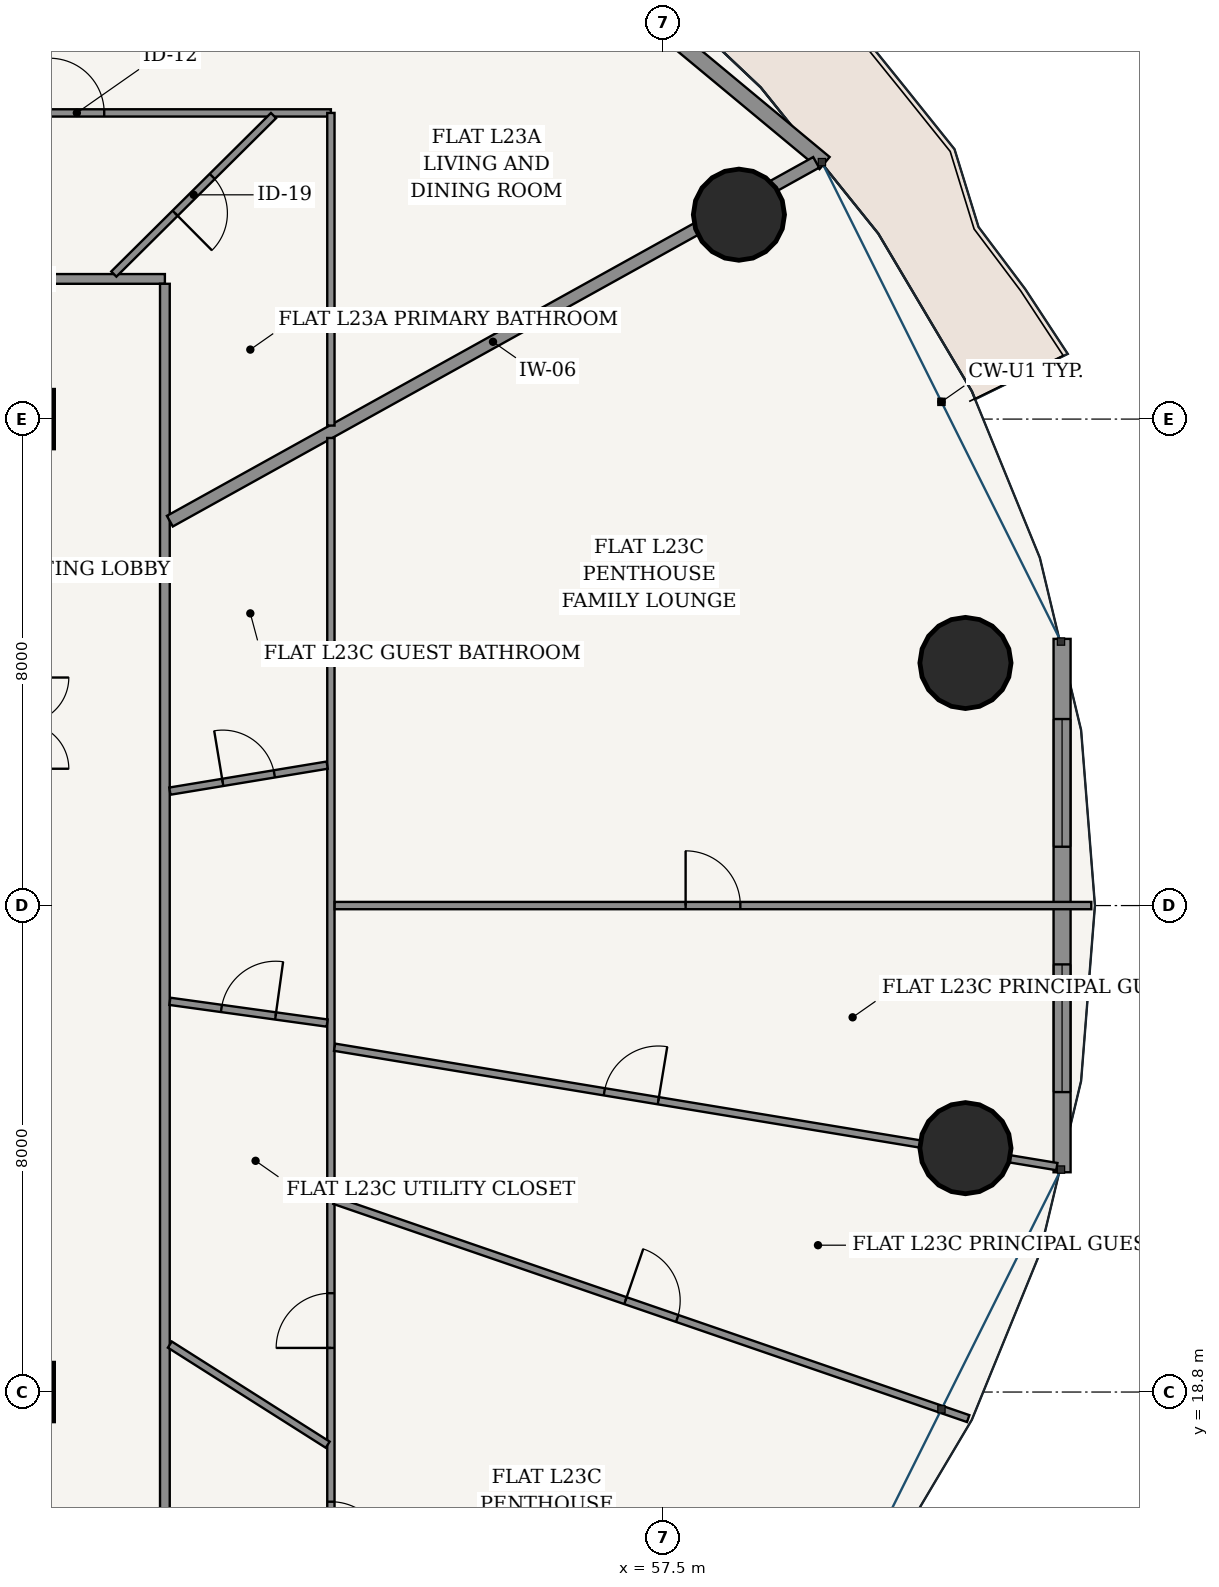
"""IFC4 building model, lengths in metres.
Left out: names, types, materials, properties, quantities, classifications, styles, units other than length and angle.
Written with IfcOpenShell. Run it as: python <this file> out.ifc"""

import sys

from ifc_helpers import new_model, si_unit, direction, frame, frame_2d, origin, origin_2d, place, context, subcontext, project, spatial, rectangle, hollow_circle, extrude, source, transform, mapped, element, fill, save


model = new_model("IFC4")
c1 = context("Model", 3, precision=1e-05, world=origin(), true_north=direction((-0.2419218956, 0.970295726276)))
c2 = subcontext(c1, "Body", "Model", "MODEL_VIEW")
j1 = project(units=[si_unit("LENGTHUNIT", "METRE"), si_unit("PLANEANGLEUNIT", "RADIAN")], contexts=[c1])
p1 = place(None, origin())
s1 = spatial("IfcSite", under=j1, at=p1, CompositionType="ELEMENT")
p2 = place(p1, origin())
s2 = spatial("IfcBuilding", under=s1, at=p2, CompositionType="ELEMENT")
p3 = place(p2, frame((0.0, 0.0, 90.6)))
s3 = spatial("IfcBuildingStorey", under=s2, at=p3, CompositionType="ELEMENT", Elevation=90.6)
for number, where, z_axis, x_axis in (
    (1, (47.0, 18.8, 0.0), (0.0, 0.0, 1.0), (1.0, 0.0, 0.0)),
    (2, (47.0, 34.8, 0.0), (0.0, 0.0, 1.0), (1.0, 0.0, 0.0)),
):
    element("IfcColumn", number, at=place(p3, frame(where, z_axis=z_axis, x_axis=x_axis)), inside=s3, PredefinedType="COLUMN", context=c2, shape_type="SweptSolid", body=[
        extrude(rectangle(XDim=0.95, YDim=0.95, at=origin_2d()), origin(), (0.0, 0.0, 1.0), 3.6),
    ])
for number, where, z_axis, x_axis in (
    (3, (62.471, 30.79, 0.0), (0.0, 0.0, 1.0), (1.0, 0.0, 0.0)),
    (4, (58.745, 38.161, 0.0), (0.0, 0.0, 1.0), (1.0, 0.0, 0.0)),
    (5, (62.471, 22.81, 0.0), (0.0, 0.0, 1.0), (1.0, 0.0, 0.0)),
):
    element("IfcColumn", number, at=place(p3, frame(where, z_axis=z_axis, x_axis=x_axis)), inside=s3, PredefinedType="COLUMN", context=c2, shape_type="SweptSolid", body=[
        extrude(hollow_circle(Radius=0.75, WallThickness=0.045, at=origin_2d()), origin(), (0.0, 0.0, 1.0), 3.6),
    ])
p4 = place(p3, frame((60.154, 39.01, 0.0), z_axis=(0.0, 0.0, 1.0), x_axis=(-0.769242574941, 0.638956853706, 0.0)))
e6 = element("IfcWall", 6, at=p4, inside=s3, PredefinedType="SOLIDWALL", context=c2, shape_type="SweptSolid", body=[
    extrude(rectangle(XDim=9.69, YDim=0.26, at=frame_2d((4.845, 0.0))), origin(), (0.0, 0.0, 1.0), 3.325),
])
p5 = place(p4, frame((4.17, 0.0, 0.0)))
e7 = element("IfcOpeningElement", 7, at=p5, cuts=e6, PredefinedType="OPENING", context=c2, shape_type="SweptSolid", body=[
    extrude(rectangle(XDim=1.35, YDim=2.2, at=frame_2d((0.675, 1.1))), frame((0.0, 0.14, 0.0), z_axis=(0.0, -1.0, 0.0), x_axis=(1.0, 0.0, 0.0)), (0.0, 0.0, 1.0), 0.28),
])
p6 = place(p3, frame((64.06, 22.414, 0.0), z_axis=(0.0, 0.0, 1.0), x_axis=(0.0, 1.0, 0.0)))
e8 = element("IfcWall", 8, at=p6, inside=s3, PredefinedType="SOLIDWALL", context=c2, shape_type="SweptSolid", body=[
    extrude(rectangle(XDim=8.771, YDim=0.28, at=frame_2d((4.386, 0.0))), origin(), (0.0, 0.0, 1.0), 3.325),
])
p7 = place(p6, frame((1.318, 0.0, 0.85)))
e9 = element("IfcOpeningElement", 9, at=p7, cuts=e8, PredefinedType="OPENING", context=c2, shape_type="SweptSolid", body=[
    extrude(rectangle(XDim=2.1, YDim=1.95, at=frame_2d((1.05, 0.975))), frame((0.0, 0.15, 0.0), z_axis=(0.0, -1.0, 0.0), x_axis=(1.0, 0.0, 0.0)), (0.0, 0.0, 1.0), 0.3),
])
p8 = place(p6, frame((5.353, 0.0, 0.85)))
e10 = element("IfcOpeningElement", 10, at=p8, cuts=e8, PredefinedType="OPENING", context=c2, shape_type="SweptSolid", body=[
    extrude(rectangle(XDim=2.1, YDim=1.95, at=frame_2d((1.05, 0.975))), frame((0.0, 0.15, 0.0), z_axis=(0.0, -1.0, 0.0), x_axis=(1.0, 0.0, 0.0)), (0.0, 0.0, 1.0), 0.3),
])
p9 = place(p3, frame((26.695, 37.105, 0.0), z_axis=(0.0, 0.0, 1.0), x_axis=(1.0, 0.0, 0.0)))
e11 = element("IfcWall", 11, at=p9, inside=s3, PredefinedType="PARTITIONING", context=c2, shape_type="SweptSolid", body=[
    extrude(rectangle(XDim=22.61, YDim=0.16, at=frame_2d((11.305, 0.0))), origin(), (0.0, 0.0, 1.0), 2.767),
])
p10 = place(p9, frame((18.058, 0.0, 0.0)))
e12 = element("IfcOpeningElement", 12, at=p10, cuts=e11, PredefinedType="OPENING", context=c2, shape_type="SweptSolid", body=[
    extrude(rectangle(XDim=0.98, YDim=2.2, at=frame_2d((0.49, 1.1))), frame((0.0, 0.09, 0.0), z_axis=(0.0, -1.0, 0.0), x_axis=(1.0, 0.0, 0.0)), (0.0, 0.0, 1.0), 0.18),
])
p11 = place(p3, frame((49.305, 16.575, 0.0), z_axis=(0.0, 0.0, 1.0), x_axis=(0.0, 1.0, 0.0)))
e13 = element("IfcWall", 13, at=p11, inside=s3, PredefinedType="PARTITIONING", context=c2, shape_type="SweptSolid", body=[
    extrude(rectangle(XDim=20.45, YDim=0.16, at=frame_2d((10.225, 0.0))), origin(), (0.0, 0.0, 1.0), 2.767),
])
p12 = place(p3, frame((49.387, 33.121, 0.0), z_axis=(0.0, 0.0, 1.0), x_axis=(0.874320165728, 0.485349613992, 0.0)))
e14 = element("IfcWall", 14, at=p12, inside=s3, PredefinedType="PARTITIONING", context=c2, shape_type="SweptSolid", body=[
    extrude(rectangle(XDim=12.156, YDim=0.2, at=frame_2d((6.078, 0.0))), origin(), (0.0, 0.0, 1.0), 2.767),
])
p13 = place(p3, frame((23.965, 39.835, 0.0), z_axis=(0.0, 0.0, 1.0), x_axis=(1.0, 0.0, 0.0)))
e15 = element("IfcWall", 15, at=p13, inside=s3, PredefinedType="PARTITIONING", context=c2, shape_type="SweptSolid", body=[
    extrude(rectangle(XDim=28.07, YDim=0.12, at=frame_2d((14.035, 0.0))), origin(), (0.0, 0.0, 1.0), 2.767),
])
p14 = place(p13, frame((23.442, 0.0, 0.0)))
e16 = element("IfcOpeningElement", 16, at=p14, cuts=e15, PredefinedType="OPENING", context=c2, shape_type="SweptSolid", body=[
    extrude(rectangle(XDim=0.9, YDim=2.15, at=frame_2d((0.45, 1.075))), frame((0.0, 0.07, 0.0), z_axis=(0.0, -1.0, 0.0), x_axis=(1.0, 0.0, 0.0)), (0.0, 0.0, 1.0), 0.14),
])
p15 = place(p3, frame((52.035, 39.835, 0.0), z_axis=(0.0, 0.0, 1.0), x_axis=(0.0, -1.0, 0.0)))
e17 = element("IfcWall", 17, at=p15, inside=s3, PredefinedType="PARTITIONING", context=c2, shape_type="SweptSolid", body=[
    extrude(rectangle(XDim=5.142, YDim=0.12, at=frame_2d((2.571, 0.0))), origin(), (0.0, 0.0, 1.0), 3.004),
])
p16 = place(p3, frame((44.526, 39.89, 0.0), z_axis=(0.0, 0.0, 1.0), x_axis=(0.446167584581, 0.894949432353, 0.0)))
e18 = element("IfcWall", 18, at=p16, inside=s3, PredefinedType="PARTITIONING", context=c2, shape_type="SweptSolid", body=[
    extrude(rectangle(XDim=8.125, YDim=0.12, at=frame_2d((4.062, 0.0))), origin(), (0.0, 0.0, 1.0), 2.767),
])
p17 = place(p16, frame((3.612, 0.0, 0.0)))
e19 = element("IfcOpeningElement", 19, at=p17, cuts=e18, PredefinedType="OPENING", context=c2, shape_type="SweptSolid", body=[
    extrude(rectangle(XDim=0.9, YDim=2.15, at=frame_2d((0.45, 1.075))), frame((0.0, 0.07, 0.0), z_axis=(0.0, -1.0, 0.0), x_axis=(1.0, 0.0, 0.0)), (0.0, 0.0, 1.0), 0.14),
])
p18 = place(p3, frame((48.465, 37.185, 0.0), z_axis=(0.0, 0.0, 1.0), x_axis=(0.709839752998, 0.704363205359, 0.0)))
e20 = element("IfcWall", 20, at=p18, inside=s3, PredefinedType="PARTITIONING", context=c2, shape_type="SweptSolid", body=[
    extrude(rectangle(XDim=3.7, YDim=0.12, at=frame_2d((1.85, 0.0))), origin(), (0.0, 0.0, 1.0), 2.767),
])
p19 = place(p18, frame((1.42, 0.0, 0.0)))
e21 = element("IfcOpeningElement", 21, at=p19, cuts=e20, PredefinedType="OPENING", context=c2, shape_type="SweptSolid", body=[
    extrude(rectangle(XDim=0.86, YDim=2.15, at=frame_2d((0.43, 1.075))), frame((0.0, 0.07, 0.0), z_axis=(0.0, -1.0, 0.0), x_axis=(1.0, 0.0, 0.0)), (0.0, 0.0, 1.0), 0.14),
])
p20 = place(p3, frame((52.035, 34.49, 0.0), z_axis=(0.0, 0.0, 1.0), x_axis=(0.0, -1.0, 0.0)))
e22 = element("IfcWall", 22, at=p20, inside=s3, PredefinedType="PARTITIONING", context=c2, shape_type="SweptSolid", body=[
    extrude(rectangle(XDim=20.725, YDim=0.12, at=frame_2d((10.362, 0.0))), origin(), (0.0, 0.0, 1.0), 2.767),
])
p21 = place(p20, frame((17.493, 0.0, 0.0)))
e23 = element("IfcOpeningElement", 23, at=p21, cuts=e22, PredefinedType="OPENING", context=c2, shape_type="SweptSolid", body=[
    extrude(rectangle(XDim=0.9, YDim=2.15, at=frame_2d((0.45, 1.075))), frame((0.0, 0.07, 0.0), z_axis=(0.0, -1.0, 0.0), x_axis=(1.0, 0.0, 0.0)), (0.0, 0.0, 1.0), 0.14),
])
p22 = place(p20, frame((14.064, 0.0, 0.0)))
e24 = element("IfcOpeningElement", 24, at=p22, cuts=e22, PredefinedType="OPENING", context=c2, shape_type="SweptSolid", body=[
    extrude(rectangle(XDim=0.9, YDim=2.15, at=frame_2d((0.45, 1.075))), frame((0.0, 0.07, 0.0), z_axis=(0.0, -1.0, 0.0), x_axis=(1.0, 0.0, 0.0)), (0.0, 0.0, 1.0), 0.14),
])
p23 = place(p3, frame((52.094, 21.95, 0.0), z_axis=(0.0, 0.0, 1.0), x_axis=(0.945573120726, -0.32540970078, 0.0)))
e25 = element("IfcWall", 25, at=p23, inside=s3, PredefinedType="PARTITIONING", context=c2, shape_type="SweptSolid", body=[
    extrude(rectangle(XDim=11.022, YDim=0.12, at=frame_2d((5.511, 0.0))), origin(), (0.0, 0.0, 1.0), 2.767),
])
p24 = place(p23, frame((5.061, 0.0, 0.0)))
e26 = element("IfcOpeningElement", 26, at=p24, cuts=e25, PredefinedType="OPENING", context=c2, shape_type="SweptSolid", body=[
    extrude(rectangle(XDim=0.9, YDim=2.15, at=frame_2d((0.45, 1.075))), frame((0.0, 0.07, 0.0), z_axis=(0.0, -1.0, 0.0), x_axis=(1.0, 0.0, 0.0)), (0.0, 0.0, 1.0), 0.14),
])
p25 = place(p3, frame((52.096, 24.47, 0.0), z_axis=(0.0, 0.0, 1.0), x_axis=(0.986618264768, -0.163047231274, 0.0)))
e27 = element("IfcWall", 27, at=p25, inside=s3, PredefinedType="PARTITIONING", context=c2, shape_type="SweptSolid", body=[
    extrude(rectangle(XDim=12.039, YDim=0.12, at=frame_2d((6.02, 0.0))), origin(), (0.0, 0.0, 1.0), 2.767),
])
p26 = place(p25, frame((4.496, 0.0, 0.0)))
e28 = element("IfcOpeningElement", 28, at=p26, cuts=e27, PredefinedType="OPENING", context=c2, shape_type="SweptSolid", body=[
    extrude(rectangle(XDim=0.9, YDim=2.15, at=frame_2d((0.45, 1.075))), frame((0.0, 0.07, 0.0), z_axis=(0.0, -1.0, 0.0), x_axis=(1.0, 0.0, 0.0)), (0.0, 0.0, 1.0), 0.14),
])
p27 = place(p3, frame((52.097, 26.8, 0.0), z_axis=(0.0, 0.0, 1.0), x_axis=(1.0, 0.0, 0.0)))
e29 = element("IfcWall", 29, at=p27, inside=s3, PredefinedType="PARTITIONING", context=c2, shape_type="SweptSolid", body=[
    extrude(rectangle(XDim=12.443, YDim=0.12, at=frame_2d((6.222, 0.0))), origin(), (0.0, 0.0, 1.0), 2.767),
])
p28 = place(p27, frame((5.771, 0.0, 0.0)))
e30 = element("IfcOpeningElement", 30, at=p28, cuts=e29, PredefinedType="OPENING", context=c2, shape_type="SweptSolid", body=[
    extrude(rectangle(XDim=0.9, YDim=2.15, at=frame_2d((0.45, 1.075))), frame((0.0, 0.07, 0.0), z_axis=(0.0, -1.0, 0.0), x_axis=(1.0, 0.0, 0.0)), (0.0, 0.0, 1.0), 0.14),
])
p29 = place(p3, frame((49.387, 19.58, 0.0), z_axis=(0.0, 0.0, 1.0), x_axis=(0.844540118368, -0.535492286094, 0.0)))
e31 = element("IfcWall", 31, at=p29, inside=s3, PredefinedType="PARTITIONING", context=c2, shape_type="SweptSolid", body=[
    extrude(rectangle(XDim=3.074, YDim=0.12, at=frame_2d((1.537, 0.0))), origin(), (0.0, 0.0, 1.0), 3.325),
])
p30 = place(p3, frame((49.387, 25.225, 0.0), z_axis=(0.0, 0.0, 1.0), x_axis=(0.990575253555, -0.136969584375, 0.0)))
e32 = element("IfcWall", 32, at=p30, inside=s3, PredefinedType="PARTITIONING", context=c2, shape_type="SweptSolid", body=[
    extrude(rectangle(XDim=2.611, YDim=0.12, at=frame_2d((1.306, 0.0))), origin(), (0.0, 0.0, 1.0), 3.325),
])
p31 = place(p30, frame((0.856, 0.0, 0.0)))
e33 = element("IfcOpeningElement", 33, at=p31, cuts=e32, PredefinedType="OPENING", context=c2, shape_type="SweptSolid", body=[
    extrude(rectangle(XDim=0.9, YDim=2.15, at=frame_2d((0.45, 1.075))), frame((0.0, 0.07, 0.0), z_axis=(0.0, -1.0, 0.0), x_axis=(1.0, 0.0, 0.0)), (0.0, 0.0, 1.0), 0.14),
])
p32 = place(p3, frame((49.387, 28.682, 0.0), z_axis=(0.0, 0.0, 1.0), x_axis=(0.986619477472, 0.163039892889, 0.0)))
e34 = element("IfcWall", 34, at=p32, inside=s3, PredefinedType="PARTITIONING", context=c2, shape_type="SweptSolid", body=[
    extrude(rectangle(XDim=2.622, YDim=0.12, at=frame_2d((1.311, 0.0))), origin(), (0.0, 0.0, 1.0), 2.767),
])
p33 = place(p32, frame((0.881, 0.0, 0.0)))
e35 = element("IfcOpeningElement", 35, at=p33, cuts=e34, PredefinedType="OPENING", context=c2, shape_type="SweptSolid", body=[
    extrude(rectangle(XDim=0.86, YDim=2.15, at=frame_2d((0.43, 1.075))), frame((0.0, 0.07, 0.0), z_axis=(0.0, -1.0, 0.0), x_axis=(1.0, 0.0, 0.0)), (0.0, 0.0, 1.0), 0.14),
])
m1 = source(origin(), c2, "Body", "SweptSolid", [
    extrude(rectangle(XDim=2.1, YDim=1.95, at=frame_2d((1.05, 0.975))), frame((0.0, 0.03, 0.0), z_axis=(0.0, -1.0, 0.0), x_axis=(1.0, 0.0, 0.0)), (0.0, 0.0, 1.0), 0.06),
])
p34 = place(p7, origin())
e36 = element("IfcWindow", 36, at=p34, inside=s3, PartitioningType="SINGLE_PANEL", PredefinedType="WINDOW", context=c2, shape_type="MappedRepresentation", body=[
    mapped(m1, transform((0.0, 0.0, 0.0), scale=1.0)),
])
fill(e9, e36)
p35 = place(p8, origin())
e37 = element("IfcWindow", 37, at=p35, inside=s3, PartitioningType="SINGLE_PANEL", PredefinedType="WINDOW", context=c2, shape_type="MappedRepresentation", body=[
    mapped(m1, transform((0.0, 0.0, 0.0), scale=1.0)),
])
fill(e10, e37)
m2 = source(origin(), c2, "Body", "SweptSolid", [
    extrude(rectangle(XDim=0.86, YDim=2.15, at=frame_2d((0.43, 1.075))), frame((0.0, 0.025, 0.0), z_axis=(0.0, -1.0, 0.0), x_axis=(1.0, 0.0, 0.0)), (0.0, 0.0, 1.0), 0.05),
])
p36 = place(p19, frame((0.86, 0.0, 0.0), z_axis=(0.0, 0.0, 1.0), x_axis=(-1.0, 0.0, 0.0)))
e38 = element("IfcDoor", 38, at=p36, inside=s3, OperationType="SINGLE_SWING_RIGHT", PredefinedType="DOOR", context=c2, shape_type="MappedRepresentation", body=[
    mapped(m2, transform((0.0, 0.0, 0.0), scale=1.0)),
])
fill(e21, e38)
m3 = source(origin(), c2, "Body", "SweptSolid", [
    extrude(rectangle(XDim=0.9, YDim=2.15, at=frame_2d((0.45, 1.075))), frame((0.0, 0.025, 0.0), z_axis=(0.0, -1.0, 0.0), x_axis=(1.0, 0.0, 0.0)), (0.0, 0.0, 1.0), 0.05),
])
p37 = place(p14, origin())
e39 = element("IfcDoor", 39, at=p37, inside=s3, OperationType="SINGLE_SWING_LEFT", PredefinedType="DOOR", context=c2, shape_type="MappedRepresentation", body=[
    mapped(m3, transform((0.0, 0.0, 0.0), scale=1.0)),
])
fill(e16, e39)
p38 = place(p21, origin())
e40 = element("IfcDoor", 40, at=p38, inside=s3, OperationType="SINGLE_SWING_RIGHT", PredefinedType="DOOR", context=c2, shape_type="MappedRepresentation", body=[
    mapped(m3, transform((0.0, 0.0, 0.0), scale=1.0)),
])
fill(e23, e40)
p39 = place(p22, frame((0.9, 0.0, 0.0), z_axis=(0.0, 0.0, 1.0), x_axis=(-1.0, 0.0, 0.0)))
e41 = element("IfcDoor", 41, at=p39, inside=s3, OperationType="SINGLE_SWING_LEFT", PredefinedType="DOOR", context=c2, shape_type="MappedRepresentation", body=[
    mapped(m3, transform((0.0, 0.0, 0.0), scale=1.0)),
])
fill(e24, e41)
p40 = place(p31, origin())
e42 = element("IfcDoor", 42, at=p40, inside=s3, OperationType="SINGLE_SWING_RIGHT", PredefinedType="DOOR", context=c2, shape_type="MappedRepresentation", body=[
    mapped(m3, transform((0.0, 0.0, 0.0), scale=1.0)),
])
fill(e33, e42)
p41 = place(p33, origin())
e43 = element("IfcDoor", 43, at=p41, inside=s3, OperationType="SINGLE_SWING_LEFT", PredefinedType="DOOR", context=c2, shape_type="MappedRepresentation", body=[
    mapped(m2, transform((0.0, 0.0, 0.0), scale=1.0)),
])
fill(e35, e43)
p42 = place(p24, origin())
e44 = element("IfcDoor", 44, at=p42, inside=s3, OperationType="SINGLE_SWING_LEFT", PredefinedType="DOOR", context=c2, shape_type="MappedRepresentation", body=[
    mapped(m3, transform((0.0, 0.0, 0.0), scale=1.0)),
])
fill(e26, e44)
p43 = place(p26, origin())
e45 = element("IfcDoor", 45, at=p43, inside=s3, OperationType="SINGLE_SWING_RIGHT", PredefinedType="DOOR", context=c2, shape_type="MappedRepresentation", body=[
    mapped(m3, transform((0.0, 0.0, 0.0), scale=1.0)),
])
fill(e28, e45)
p44 = place(p28, origin())
e46 = element("IfcDoor", 46, at=p44, inside=s3, OperationType="SINGLE_SWING_LEFT", PredefinedType="DOOR", context=c2, shape_type="MappedRepresentation", body=[
    mapped(m3, transform((0.0, 0.0, 0.0), scale=1.0)),
])
fill(e30, e46)
save(model, sys.argv[1])
